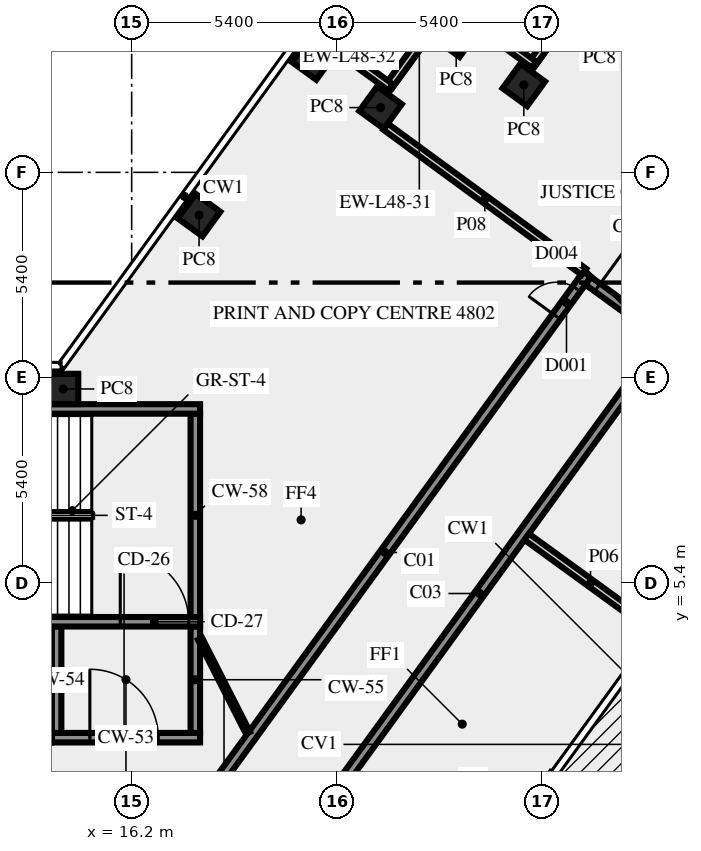
"""IFC4 building model, lengths in metres.
Left out: names, types, materials, properties, quantities, classifications, styles, units other than length and angle.
Written with IfcOpenShell. Run it as: python <this file> out.ifc"""

import sys

from ifc_helpers import new_model, si_unit, direction, frame, frame_2d, origin, origin_2d, place, context, subcontext, project, spatial, rectangle, extrude, element, fill, save


model = new_model("IFC4")
c1 = context("Model", 3, precision=1e-05, world=origin(), true_north=direction((0.0, 1.0)))
c2 = subcontext(c1, "Body", "Model", "MODEL_VIEW")
j1 = project(units=[si_unit("LENGTHUNIT", "METRE"), si_unit("PLANEANGLEUNIT", "RADIAN")], contexts=[c1])
p1 = place(None, origin())
s1 = spatial("IfcSite", under=j1, at=p1, CompositionType="ELEMENT")
p2 = place(p1, origin())
s2 = spatial("IfcBuilding", under=s1, at=p2, CompositionType="ELEMENT")
p3 = place(p2, frame((0.0, 0.0, 206.0)))
s3 = spatial("IfcBuildingStorey", under=s2, at=p3, CompositionType="ELEMENT", Elevation=206.0)
for number, where, z_axis, x_axis in (
    (1, (26.519, 18.5, 0.0), (0.0, 0.0, 1.0), (-0.809, 0.588, 0.0)),
    (2, (24.74, 19.795, 0.0), (0.0, 0.0, 1.0), (-0.588, -0.809, 0.0)),
    (3, (22.749, 17.904, 0.0), (0.0, 0.0, 1.0), (-0.588, -0.809, 0.0)),
    (4, (20.97, 19.195, 0.0), (0.0, 0.0, 1.0), (-0.588, -0.809, 0.0)),
    (5, (17.974, 15.075, 0.0), (0.0, 0.0, 1.0), (-0.588, -0.809, 0.0)),
    (6, (14.395, 10.5, 0.0), (0.0, 0.0, 1.0), (-1.0, 0.0, 0.0)),
):
    element("IfcColumn", number, at=place(p3, frame(where, z_axis=z_axis, x_axis=x_axis)), inside=s3, PredefinedType="COLUMN", context=c2, shape_type="SweptSolid", body=[
        extrude(rectangle(XDim=0.8, YDim=0.8, at=origin_2d()), origin(), (0.0, 0.0, 1.0), 3.65),
    ])
p4 = place(p3, frame((28.334, 21.262, 0.0), z_axis=(0.0, 0.0, 1.0), x_axis=(-0.587762999008, -0.809033161865, 0.0)))
e7 = element("IfcWall", 7, at=p4, inside=s3, PredefinedType="SOLIDWALL", context=c2, shape_type="SweptSolid", body=[
    extrude(rectangle(XDim=2.7, YDim=0.2, at=frame_2d((1.35, 0.0))), origin(), (0.0, 0.0, 1.0), 3.65),
])
p5 = place(p3, frame((26.785, 19.036, 0.0), z_axis=(0.0, 0.0, 1.0), x_axis=(-0.809064397168, 0.587720002413, 0.0)))
e8 = element("IfcWall", 8, at=p5, inside=s3, PredefinedType="SOLIDWALL", context=c2, shape_type="SweptSolid", body=[
    extrude(rectangle(XDim=2.7, YDim=0.2, at=frame_2d((1.35, 0.0))), origin(), (0.0, 0.0, 1.0), 3.65),
])
for number, where, z_axis, x_axis in (
    (9, (24.563, 20.665, 0.0), (0.0, 0.0, 1.0), (-0.588, -0.809, 0.0)),
    (10, (23.013, 18.438, 0.0), (0.0, 0.0, 1.0), (-0.809, 0.588, 0.0)),
):
    element("IfcWall", number, at=place(p3, frame(where, z_axis=z_axis, x_axis=x_axis)), inside=s3, PredefinedType="SOLIDWALL", context=c2, shape_type="SweptSolid", body=[
        extrude(rectangle(XDim=2.7, YDim=0.2, at=frame_2d((1.35, 0.0))), origin(), (0.0, 0.0, 1.0), 3.65),
    ])
p6 = place(p3, frame((14.1, 1.325, 0.0), z_axis=(0.0, 0.0, 1.0), x_axis=(1.0, 0.0, 0.0)))
e11 = element("IfcWall", 11, at=p6, inside=s3, PredefinedType="SHEAR", context=c2, shape_type="SweptSolid", body=[
    extrude(rectangle(XDim=3.9, YDim=0.25, at=frame_2d((1.95, 0.0))), origin(), (0.0, 0.0, 1.0), 3.65),
])
p7 = place(p6, frame((1.0, 0.0, 0.0)))
e12 = element("IfcOpeningElement", 12, at=p7, cuts=e11, PredefinedType="OPENING", context=c2, shape_type="SweptSolid", body=[
    extrude(rectangle(XDim=1.8, YDim=2.1, at=frame_2d((0.9, 1.05))), frame((0.0, 0.135, 0.0), z_axis=(0.0, -1.0, 0.0), x_axis=(1.0, 0.0, 0.0)), (0.0, 0.0, 1.0), 0.27),
])
for number, where, z_axis, x_axis in (
    (13, (14.225, 1.45, 0.0), (0.0, 0.0, 1.0), (0.0, 1.0, 0.0)),
    (14, (17.875, 1.45, 0.0), (0.0, 0.0, 1.0), (0.0, 1.0, 0.0)),
):
    element("IfcWall", number, at=place(p3, frame(where, z_axis=z_axis, x_axis=x_axis)), inside=s3, PredefinedType="SHEAR", context=c2, shape_type="SweptSolid", body=[
        extrude(rectangle(XDim=2.8, YDim=0.25, at=frame_2d((1.4, 0.0))), origin(), (0.0, 0.0, 1.0), 3.65),
    ])
p8 = place(p3, frame((7.5, 4.375, 0.0), z_axis=(0.0, 0.0, 1.0), x_axis=(1.0, 0.0, 0.0)))
e15 = element("IfcWall", 15, at=p8, inside=s3, PredefinedType="SHEAR", context=c2, shape_type="SweptSolid", body=[
    extrude(rectangle(XDim=10.5, YDim=0.25, at=frame_2d((5.25, 0.0))), origin(), (0.0, 0.0, 1.0), 3.65),
])
p9 = place(p8, frame((8.4, 0.0, 0.0)))
e16 = element("IfcOpeningElement", 16, at=p9, cuts=e15, PredefinedType="OPENING", context=c2, shape_type="SweptSolid", body=[
    extrude(rectangle(XDim=1.8, YDim=2.1, at=frame_2d((0.9, 1.05))), frame((0.0, 0.135, 0.0), z_axis=(0.0, -1.0, 0.0), x_axis=(1.0, 0.0, 0.0)), (0.0, 0.0, 1.0), 0.27),
])
p10 = place(p3, frame((17.875, 4.5, 0.0), z_axis=(0.0, 0.0, 1.0), x_axis=(0.0, 1.0, 0.0)))
e17 = element("IfcWall", 17, at=p10, inside=s3, PredefinedType="SHEAR", context=c2, shape_type="SweptSolid", body=[
    extrude(rectangle(XDim=5.35, YDim=0.25, at=frame_2d((2.675, 0.0))), origin(), (0.0, 0.0, 1.0), 3.65),
])
p11 = place(p3, frame((7.5, 9.975, 0.0), z_axis=(0.0, 0.0, 1.0), x_axis=(1.0, 0.0, 0.0)))
e18 = element("IfcWall", 18, at=p11, inside=s3, PredefinedType="SHEAR", context=c2, shape_type="SweptSolid", body=[
    extrude(rectangle(XDim=10.5, YDim=0.25, at=frame_2d((5.25, 0.0))), origin(), (0.0, 0.0, 1.0), 3.65),
])
p12 = place(p11, frame((2.0, 0.0, 1.0)))
e19 = element("IfcOpeningElement", 19, at=p12, cuts=e18, PredefinedType="OPENING", context=c2, shape_type="SweptSolid", body=[
    extrude(rectangle(XDim=1.2, YDim=1.2, at=frame_2d((0.6, 0.6))), frame((0.0, 0.135, 0.0), z_axis=(0.0, -1.0, 0.0), x_axis=(1.0, 0.0, 0.0)), (0.0, 0.0, 1.0), 0.27),
])
p13 = place(p3, frame((17.545, -1.125, 0.0), z_axis=(0.0, 0.0, 1.0), x_axis=(0.58779555165, 0.809009511354, 0.0)))
e20 = element("IfcWall", 20, at=p13, inside=s3, PredefinedType="SOLIDWALL", context=c2, shape_type="SweptSolid", body=[
    extrude(rectangle(XDim=18.103, YDim=0.25, at=frame_2d((9.052, 0.0))), origin(), (0.0, 0.0, 1.0), 3.65),
])
p14 = place(p13, frame((16.728, 0.0, 0.0)))
e21 = element("IfcOpeningElement", 21, at=p14, cuts=e20, PredefinedType="OPENING", context=c2, shape_type="SweptSolid", body=[
    extrude(rectangle(XDim=0.9, YDim=2.1, at=frame_2d((0.45, 1.05))), frame((0.0, 0.135, 0.0), z_axis=(0.0, -1.0, 0.0), x_axis=(1.0, 0.0, 0.0)), (0.0, 0.0, 1.0), 0.27),
])
p15 = place(p3, frame((28.213, 13.346, 0.0), z_axis=(0.0, 0.0, 1.0), x_axis=(0.809006914995, -0.587799125119, 0.0)))
e22 = element("IfcWall", 22, at=p15, inside=s3, PredefinedType="SOLIDWALL", context=c2, shape_type="SweptSolid", body=[
    extrude(rectangle(XDim=2.65, YDim=0.25, at=frame_2d((1.325, 0.0))), origin(), (0.0, 0.0, 1.0), 3.65),
])
p16 = place(p15, frame((0.3, 0.0, 0.0)))
e23 = element("IfcOpeningElement", 23, at=p16, cuts=e22, PredefinedType="OPENING", context=c2, shape_type="SweptSolid", body=[
    extrude(rectangle(XDim=1.8, YDim=2.1, at=frame_2d((0.9, 1.05))), frame((0.0, 0.135, 0.0), z_axis=(0.0, -1.0, 0.0), x_axis=(1.0, 0.0, 0.0)), (0.0, 0.0, 1.0), 0.27),
])
p17 = place(p3, frame((30.183, 11.761, 0.0), z_axis=(0.0, 0.0, 1.0), x_axis=(-0.587781762867, -0.80901952958, 0.0)))
e24 = element("IfcWall", 24, at=p17, inside=s3, PredefinedType="SOLIDWALL", context=c2, shape_type="SweptSolid", body=[
    extrude(rectangle(XDim=16.42, YDim=0.25, at=frame_2d((8.21, 0.0))), origin(), (0.0, 0.0, 1.0), 3.65),
])
p18 = place(p17, frame((14.988, 0.0, 0.0)))
e25 = element("IfcOpeningElement", 25, at=p18, cuts=e24, PredefinedType="OPENING", context=c2, shape_type="SweptSolid", body=[
    extrude(rectangle(XDim=0.9, YDim=2.1, at=frame_2d((0.45, 1.05))), frame((0.0, 0.135, 0.0), z_axis=(0.0, -1.0, 0.0), x_axis=(1.0, 0.0, 0.0)), (0.0, 0.0, 1.0), 0.27),
])
p19 = place(p17, frame((0.225, 0.0, 0.0)))
e26 = element("IfcOpeningElement", 26, at=p19, cuts=e24, PredefinedType="OPENING", context=c2, shape_type="SweptSolid", body=[
    extrude(rectangle(XDim=0.9, YDim=2.1, at=frame_2d((0.45, 1.05))), frame((0.0, 0.135, 0.0), z_axis=(0.0, -1.0, 0.0), x_axis=(1.0, 0.0, 0.0)), (0.0, 0.0, 1.0), 0.27),
])
p20 = place(p3, frame((29.954, 4.172, 0.0), z_axis=(0.0, 0.0, 1.0), x_axis=(-0.809193718638, 0.587541935283, 0.0)))
e27 = element("IfcWall", 27, at=p20, inside=s3, PredefinedType="SOLIDWALL", context=c2, shape_type="SweptSolid", body=[
    extrude(rectangle(XDim=4.15, YDim=0.2, at=frame_2d((2.075, 0.0))), origin(), (0.0, 0.0, 1.0), 3.65),
])
p21 = place(p3, frame((22.884, 17.401, 0.0), z_axis=(0.0, 0.0, 1.0), x_axis=(0.80698686941, -0.590569380005, 0.0)))
e28 = element("IfcWall", 28, at=p21, inside=s3, PredefinedType="SOLIDWALL", context=c2, shape_type="SweptSolid", body=[
    extrude(rectangle(XDim=6.465, YDim=0.2, at=frame_2d((3.232, 0.0))), origin(), (0.0, 0.0, 1.0), 3.65),
])
p22 = place(p3, frame((18.0, 3.925, 0.0), z_axis=(0.0, 0.0, 1.0), x_axis=(0.453950796792, -0.891026752736, 0.0)))
e29 = element("IfcWall", 29, at=p22, inside=s3, PredefinedType="PARTITIONING", context=c2, shape_type="SweptSolid", body=[
    extrude(rectangle(XDim=2.778, YDim=0.12, at=frame_2d((1.389, 0.0))), origin(), (0.0, 0.0, 1.0), 3.65),
])
p23 = place(p7, origin())
e30 = element("IfcDoor", 30, at=p23, inside=s3, OperationType="DOUBLE_DOOR_SINGLE_SWING", PredefinedType="DOOR", context=c2, shape_type="SweptSolid", body=[
    extrude(rectangle(XDim=1.8, YDim=2.1, at=frame_2d((0.9, 1.05))), frame((0.0, 0.025, 0.0), z_axis=(0.0, -1.0, 0.0), x_axis=(1.0, 0.0, 0.0)), (0.0, 0.0, 1.0), 0.05),
])
fill(e12, e30)
p24 = place(p9, origin())
e31 = element("IfcDoor", 31, at=p24, inside=s3, OperationType="DOUBLE_DOOR_SINGLE_SWING", PredefinedType="DOOR", context=c2, shape_type="SweptSolid", body=[
    extrude(rectangle(XDim=1.8, YDim=2.1, at=frame_2d((0.9, 1.05))), frame((0.0, 0.025, 0.0), z_axis=(0.0, -1.0, 0.0), x_axis=(1.0, 0.0, 0.0)), (0.0, 0.0, 1.0), 0.05),
])
fill(e16, e31)
p25 = place(p16, origin())
e32 = element("IfcDoor", 32, at=p25, inside=s3, OperationType="DOUBLE_DOOR_SINGLE_SWING", PredefinedType="DOOR", context=c2, shape_type="SweptSolid", body=[
    extrude(rectangle(XDim=1.8, YDim=2.1, at=frame_2d((0.9, 1.05))), frame((0.0, 0.025, 0.0), z_axis=(0.0, -1.0, 0.0), x_axis=(1.0, 0.0, 0.0)), (0.0, 0.0, 1.0), 0.05),
])
fill(e23, e32)
p26 = place(p14, origin())
e33 = element("IfcDoor", 33, at=p26, inside=s3, OperationType="SINGLE_SWING_RIGHT", PredefinedType="DOOR", context=c2, shape_type="SweptSolid", body=[
    extrude(rectangle(XDim=0.9, YDim=2.1, at=frame_2d((0.45, 1.05))), frame((0.0, 0.025, 0.0), z_axis=(0.0, -1.0, 0.0), x_axis=(1.0, 0.0, 0.0)), (0.0, 0.0, 1.0), 0.05),
])
fill(e21, e33)
save(model, sys.argv[1])
